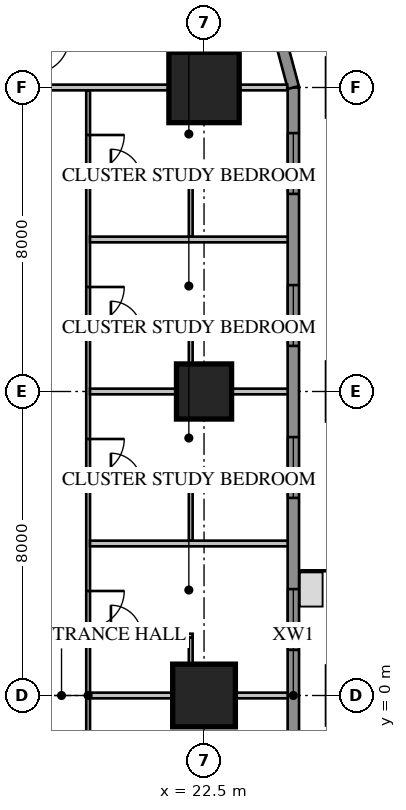
"""IFC4 building model, lengths in metres.
Left out: names, types, materials, properties, quantities, classifications, styles, units other than length and angle.
Written with IfcOpenShell. Run it as: python <this file> out.ifc"""

import sys

from ifc_helpers import new_model, si_unit, direction, frame, frame_2d, origin, origin_2d, place, context, subcontext, project, spatial, rectangle, extrude, element, fill, save


model = new_model("IFC4")
c1 = context("Model", 3, precision=1e-05, world=origin(), true_north=direction((0.0, 1.0)))
c2 = subcontext(c1, "Body", "Model", "MODEL_VIEW")
j1 = project(units=[si_unit("LENGTHUNIT", "METRE"), si_unit("PLANEANGLEUNIT", "RADIAN")], contexts=[c1])
p1 = place(None, origin())
s1 = spatial("IfcSite", under=j1, at=p1, CompositionType="ELEMENT")
p2 = place(p1, origin())
s2 = spatial("IfcBuilding", under=s1, at=p2, CompositionType="ELEMENT")
p3 = place(p2, frame((0.0, 0.0, 23.7)))
s3 = spatial("IfcBuildingStorey", under=s2, at=p3, CompositionType="ELEMENT", Elevation=23.7)
p4 = place(p3, frame((22.5, 0.0, 0.0), z_axis=(0.0, 0.0, 1.0), x_axis=(1.0, 0.0, 0.0)))
e1 = element("IfcColumn", 1, at=p4, inside=s3, PredefinedType="COLUMN", context=c2, shape_type="SweptSolid", body=[
    extrude(rectangle(XDim=1.65, YDim=1.65, at=origin_2d()), origin(), (0.0, 0.0, 1.0), 3.85),
])
p5 = place(p3, frame((22.5, 8.0, 0.0), z_axis=(0.0, 0.0, 1.0), x_axis=(1.0, 0.0, 0.0)))
e2 = element("IfcColumn", 2, at=p5, inside=s3, PredefinedType="COLUMN", context=c2, shape_type="SweptSolid", body=[
    extrude(rectangle(XDim=1.45, YDim=1.45, at=origin_2d()), origin(), (0.0, 0.0, 1.0), 3.85),
])
p6 = place(p3, frame((22.5, 16.0, 0.0), z_axis=(0.0, 0.0, 1.0), x_axis=(1.0, 0.0, 0.0)))
e3 = element("IfcColumn", 3, at=p6, inside=s3, PredefinedType="COLUMN", context=c2, shape_type="SweptSolid", body=[
    extrude(rectangle(XDim=1.85, YDim=1.85, at=origin_2d()), origin(), (0.0, 0.0, 1.0), 3.85),
])
p7 = place(p3, frame((24.85, -16.0, 0.0), z_axis=(0.0, 0.0, 1.0), x_axis=(0.0, 1.0, 0.0)))
e4 = element("IfcWall", 4, at=p7, inside=s3, PredefinedType="SOLIDWALL", context=c2, shape_type="SweptSolid", body=[
    extrude(rectangle(XDim=32.0, YDim=0.3, at=frame_2d((16.0, 0.0))), origin(), (0.0, 0.0, 1.0), 3.65),
])
p8 = place(p7, frame((1.2, 0.0, 0.75)))
e5 = element("IfcOpeningElement", 5, at=p8, cuts=e4, PredefinedType="OPENING", context=c2, shape_type="SweptSolid", body=[
    extrude(rectangle(XDim=1.6, YDim=1.8, at=frame_2d((0.8, 0.9))), frame((0.0, 0.17, 0.0), z_axis=(0.0, -1.0, 0.0), x_axis=(1.0, 0.0, 0.0)), (0.0, 0.0, 1.0), 0.34),
])
p9 = place(p7, frame((5.2, 0.0, 0.75)))
e6 = element("IfcOpeningElement", 6, at=p9, cuts=e4, PredefinedType="OPENING", context=c2, shape_type="SweptSolid", body=[
    extrude(rectangle(XDim=1.6, YDim=1.8, at=frame_2d((0.8, 0.9))), frame((0.0, 0.17, 0.0), z_axis=(0.0, -1.0, 0.0), x_axis=(1.0, 0.0, 0.0)), (0.0, 0.0, 1.0), 0.34),
])
p10 = place(p7, frame((17.2, 0.0, 0.75)))
e7 = element("IfcOpeningElement", 7, at=p10, cuts=e4, PredefinedType="OPENING", context=c2, shape_type="SweptSolid", body=[
    extrude(rectangle(XDim=1.6, YDim=1.8, at=frame_2d((0.8, 0.9))), frame((0.0, 0.17, 0.0), z_axis=(0.0, -1.0, 0.0), x_axis=(1.0, 0.0, 0.0)), (0.0, 0.0, 1.0), 0.34),
])
p11 = place(p7, frame((21.2, 0.0, 0.75)))
e8 = element("IfcOpeningElement", 8, at=p11, cuts=e4, PredefinedType="OPENING", context=c2, shape_type="SweptSolid", body=[
    extrude(rectangle(XDim=1.6, YDim=1.8, at=frame_2d((0.8, 0.9))), frame((0.0, 0.17, 0.0), z_axis=(0.0, -1.0, 0.0), x_axis=(1.0, 0.0, 0.0)), (0.0, 0.0, 1.0), 0.34),
])
p12 = place(p7, frame((25.2, 0.0, 0.75)))
e9 = element("IfcOpeningElement", 9, at=p12, cuts=e4, PredefinedType="OPENING", context=c2, shape_type="SweptSolid", body=[
    extrude(rectangle(XDim=1.6, YDim=1.8, at=frame_2d((0.8, 0.9))), frame((0.0, 0.17, 0.0), z_axis=(0.0, -1.0, 0.0), x_axis=(1.0, 0.0, 0.0)), (0.0, 0.0, 1.0), 0.34),
])
p13 = place(p7, frame((29.2, 0.0, 0.75)))
e10 = element("IfcOpeningElement", 10, at=p13, cuts=e4, PredefinedType="OPENING", context=c2, shape_type="SweptSolid", body=[
    extrude(rectangle(XDim=1.6, YDim=1.8, at=frame_2d((0.8, 0.9))), frame((0.0, 0.17, 0.0), z_axis=(0.0, -1.0, 0.0), x_axis=(1.0, 0.0, 0.0)), (0.0, 0.0, 1.0), 0.34),
])
p14 = place(p7, frame((8.8, 0.0, 0.75)))
e11 = element("IfcOpeningElement", 11, at=p14, cuts=e4, PredefinedType="OPENING", context=c2, shape_type="SweptSolid", body=[
    extrude(rectangle(XDim=2.4, YDim=1.8, at=frame_2d((1.2, 0.9))), frame((0.0, 0.17, 0.0), z_axis=(0.0, -1.0, 0.0), x_axis=(1.0, 0.0, 0.0)), (0.0, 0.0, 1.0), 0.34),
])
p15 = place(p7, frame((13.812, 0.0, 0.0)))
e12 = element("IfcOpeningElement", 12, at=p15, cuts=e4, PredefinedType="OPENING", context=c2, shape_type="SweptSolid", body=[
    extrude(rectangle(XDim=1.0, YDim=2.4, at=frame_2d((0.5, 1.2))), frame((0.0, 0.17, 0.0), z_axis=(0.0, -1.0, 0.0), x_axis=(1.0, 0.0, 0.0)), (0.0, 0.0, 1.0), 0.34),
])
p16 = place(p3, frame((24.85, 16.0, 0.0), z_axis=(0.0, 0.0, 1.0), x_axis=(-0.258839972501, 0.965920218567, 0.0)))
e13 = element("IfcWall", 13, at=p16, inside=s3, PredefinedType="SOLIDWALL", context=c2, shape_type="SweptSolid", body=[
    extrude(rectangle(XDim=4.581, YDim=0.3, at=frame_2d((2.291, 0.0))), origin(), (0.0, 0.0, 1.0), 3.65),
])
p17 = place(p3, frame((19.45, -15.925, 0.0), z_axis=(0.0, 0.0, 1.0), x_axis=(0.0, 1.0, 0.0)))
e14 = element("IfcWall", 14, at=p17, inside=s3, PredefinedType="PARTITIONING", context=c2, shape_type="SweptSolid", body=[
    extrude(rectangle(XDim=31.85, YDim=0.1, at=frame_2d((15.925, 0.0))), origin(), (0.0, 0.0, 1.0), 3.65),
])
p18 = place(p17, frame((10.125, 0.0, 0.0)))
e15 = element("IfcOpeningElement", 15, at=p18, cuts=e14, PredefinedType="OPENING", context=c2, shape_type="SweptSolid", body=[
    extrude(rectangle(XDim=1.0, YDim=2.1, at=frame_2d((0.5, 1.05))), frame((0.0, 0.07, 0.0), z_axis=(0.0, -1.0, 0.0), x_axis=(1.0, 0.0, 0.0)), (0.0, 0.0, 1.0), 0.14),
])
p19 = place(p17, frame((8.3, 0.0, 0.0)))
e16 = element("IfcOpeningElement", 16, at=p19, cuts=e14, PredefinedType="OPENING", context=c2, shape_type="SweptSolid", body=[
    extrude(rectangle(XDim=0.8, YDim=2.1, at=frame_2d((0.4, 1.05))), frame((0.0, 0.07, 0.0), z_axis=(0.0, -1.0, 0.0), x_axis=(1.0, 0.0, 0.0)), (0.0, 0.0, 1.0), 0.14),
])
p20 = place(p17, frame((1.725, 0.0, 0.0)))
e17 = element("IfcOpeningElement", 17, at=p20, cuts=e14, PredefinedType="OPENING", context=c2, shape_type="SweptSolid", body=[
    extrude(rectangle(XDim=0.95, YDim=2.1, at=frame_2d((0.475, 1.05))), frame((0.0, 0.07, 0.0), z_axis=(0.0, -1.0, 0.0), x_axis=(1.0, 0.0, 0.0)), (0.0, 0.0, 1.0), 0.14),
])
p21 = place(p17, frame((5.725, 0.0, 0.0)))
e18 = element("IfcOpeningElement", 18, at=p21, cuts=e14, PredefinedType="OPENING", context=c2, shape_type="SweptSolid", body=[
    extrude(rectangle(XDim=0.95, YDim=2.1, at=frame_2d((0.475, 1.05))), frame((0.0, 0.07, 0.0), z_axis=(0.0, -1.0, 0.0), x_axis=(1.0, 0.0, 0.0)), (0.0, 0.0, 1.0), 0.14),
])
p22 = place(p17, frame((17.725, 0.0, 0.0)))
e19 = element("IfcOpeningElement", 19, at=p22, cuts=e14, PredefinedType="OPENING", context=c2, shape_type="SweptSolid", body=[
    extrude(rectangle(XDim=0.95, YDim=2.1, at=frame_2d((0.475, 1.05))), frame((0.0, 0.07, 0.0), z_axis=(0.0, -1.0, 0.0), x_axis=(1.0, 0.0, 0.0)), (0.0, 0.0, 1.0), 0.14),
])
p23 = place(p17, frame((21.725, 0.0, 0.0)))
e20 = element("IfcOpeningElement", 20, at=p23, cuts=e14, PredefinedType="OPENING", context=c2, shape_type="SweptSolid", body=[
    extrude(rectangle(XDim=0.95, YDim=2.1, at=frame_2d((0.475, 1.05))), frame((0.0, 0.07, 0.0), z_axis=(0.0, -1.0, 0.0), x_axis=(1.0, 0.0, 0.0)), (0.0, 0.0, 1.0), 0.14),
])
p24 = place(p17, frame((25.725, 0.0, 0.0)))
e21 = element("IfcOpeningElement", 21, at=p24, cuts=e14, PredefinedType="OPENING", context=c2, shape_type="SweptSolid", body=[
    extrude(rectangle(XDim=0.95, YDim=2.1, at=frame_2d((0.475, 1.05))), frame((0.0, 0.07, 0.0), z_axis=(0.0, -1.0, 0.0), x_axis=(1.0, 0.0, 0.0)), (0.0, 0.0, 1.0), 0.14),
])
p25 = place(p17, frame((29.725, 0.0, 0.0)))
e22 = element("IfcOpeningElement", 22, at=p25, cuts=e14, PredefinedType="OPENING", context=c2, shape_type="SweptSolid", body=[
    extrude(rectangle(XDim=0.95, YDim=2.1, at=frame_2d((0.475, 1.05))), frame((0.0, 0.07, 0.0), z_axis=(0.0, -1.0, 0.0), x_axis=(1.0, 0.0, 0.0)), (0.0, 0.0, 1.0), 0.14),
])
p26 = place(p3, frame((19.5, 0.0, 0.0), z_axis=(0.0, 0.0, 1.0), x_axis=(1.0, 0.0, 0.0)))
e23 = element("IfcWall", 23, at=p26, inside=s3, PredefinedType="PARTITIONING", context=c2, shape_type="SweptSolid", body=[
    extrude(rectangle(XDim=5.2, YDim=0.15, at=frame_2d((2.6, 0.0))), origin(), (0.0, 0.0, 1.0), 2.957),
])
for number, where, z_axis, x_axis in (
    (24, (19.5, 4.0, 0.0), (0.0, 0.0, 1.0), (1.0, 0.0, 0.0)),
    (25, (19.5, 8.0, 0.0), (0.0, 0.0, 1.0), (1.0, 0.0, 0.0)),
    (26, (19.5, 12.0, 0.0), (0.0, 0.0, 1.0), (1.0, 0.0, 0.0)),
):
    element("IfcWall", number, at=place(p3, frame(where, z_axis=z_axis, x_axis=x_axis)), inside=s3, PredefinedType="PARTITIONING", context=c2, shape_type="SweptSolid", body=[
        extrude(rectangle(XDim=5.2, YDim=0.15, at=frame_2d((2.6, 0.0))), origin(), (0.0, 0.0, 1.0), 3.65),
    ])
p27 = place(p3, frame((18.1, 16.0, 0.0), z_axis=(0.0, 0.0, 1.0), x_axis=(1.0, 0.0, 0.0)))
e27 = element("IfcWall", 27, at=p27, inside=s3, PredefinedType="PARTITIONING", context=c2, shape_type="SweptSolid", body=[
    extrude(rectangle(XDim=6.589, YDim=0.15, at=frame_2d((3.295, 0.0))), origin(), (0.0, 0.0, 1.0), 3.65),
])
p28 = place(p3, frame((19.5, 1.575, 0.0), z_axis=(0.0, 0.0, 1.0), x_axis=(1.0, 0.0, 0.0)))
e28 = element("IfcWall", 28, at=p28, inside=s3, PredefinedType="PARTITIONING", context=c2, shape_type="SweptSolid", body=[
    extrude(rectangle(XDim=2.7, YDim=0.1, at=frame_2d((1.35, 0.0))), origin(), (0.0, 0.0, 1.0), 3.65),
])
p29 = place(p28, frame((0.55, 0.0, 0.0)))
e29 = element("IfcOpeningElement", 29, at=p29, cuts=e28, PredefinedType="OPENING", context=c2, shape_type="SweptSolid", body=[
    extrude(rectangle(XDim=0.8, YDim=2.1, at=frame_2d((0.4, 1.05))), frame((0.0, 0.07, 0.0), z_axis=(0.0, -1.0, 0.0), x_axis=(1.0, 0.0, 0.0)), (0.0, 0.0, 1.0), 0.14),
])
p30 = place(p3, frame((22.15, 0.075, 0.0), z_axis=(0.0, 0.0, 1.0), x_axis=(0.0, 1.0, 0.0)))
e30 = element("IfcWall", 30, at=p30, inside=s3, PredefinedType="PARTITIONING", context=c2, shape_type="SweptSolid", body=[
    extrude(rectangle(XDim=1.45, YDim=0.1, at=frame_2d((0.725, 0.0))), origin(), (0.0, 0.0, 1.0), 3.65),
])
p31 = place(p3, frame((19.5, 5.575, 0.0), z_axis=(0.0, 0.0, 1.0), x_axis=(1.0, 0.0, 0.0)))
e31 = element("IfcWall", 31, at=p31, inside=s3, PredefinedType="PARTITIONING", context=c2, shape_type="SweptSolid", body=[
    extrude(rectangle(XDim=2.7, YDim=0.1, at=frame_2d((1.35, 0.0))), origin(), (0.0, 0.0, 1.0), 3.65),
])
p32 = place(p31, frame((0.55, 0.0, 0.0)))
e32 = element("IfcOpeningElement", 32, at=p32, cuts=e31, PredefinedType="OPENING", context=c2, shape_type="SweptSolid", body=[
    extrude(rectangle(XDim=0.8, YDim=2.1, at=frame_2d((0.4, 1.05))), frame((0.0, 0.07, 0.0), z_axis=(0.0, -1.0, 0.0), x_axis=(1.0, 0.0, 0.0)), (0.0, 0.0, 1.0), 0.14),
])
p33 = place(p3, frame((22.15, 4.075, 0.0), z_axis=(0.0, 0.0, 1.0), x_axis=(0.0, 1.0, 0.0)))
e33 = element("IfcWall", 33, at=p33, inside=s3, PredefinedType="PARTITIONING", context=c2, shape_type="SweptSolid", body=[
    extrude(rectangle(XDim=1.45, YDim=0.1, at=frame_2d((0.725, 0.0))), origin(), (0.0, 0.0, 1.0), 3.65),
])
p34 = place(p3, frame((19.5, 9.575, 0.0), z_axis=(0.0, 0.0, 1.0), x_axis=(1.0, 0.0, 0.0)))
e34 = element("IfcWall", 34, at=p34, inside=s3, PredefinedType="PARTITIONING", context=c2, shape_type="SweptSolid", body=[
    extrude(rectangle(XDim=2.7, YDim=0.1, at=frame_2d((1.35, 0.0))), origin(), (0.0, 0.0, 1.0), 3.65),
])
p35 = place(p34, frame((0.55, 0.0, 0.0)))
e35 = element("IfcOpeningElement", 35, at=p35, cuts=e34, PredefinedType="OPENING", context=c2, shape_type="SweptSolid", body=[
    extrude(rectangle(XDim=0.8, YDim=2.1, at=frame_2d((0.4, 1.05))), frame((0.0, 0.07, 0.0), z_axis=(0.0, -1.0, 0.0), x_axis=(1.0, 0.0, 0.0)), (0.0, 0.0, 1.0), 0.14),
])
p36 = place(p3, frame((22.15, 8.075, 0.0), z_axis=(0.0, 0.0, 1.0), x_axis=(0.0, 1.0, 0.0)))
e36 = element("IfcWall", 36, at=p36, inside=s3, PredefinedType="PARTITIONING", context=c2, shape_type="SweptSolid", body=[
    extrude(rectangle(XDim=1.45, YDim=0.1, at=frame_2d((0.725, 0.0))), origin(), (0.0, 0.0, 1.0), 3.65),
])
p37 = place(p3, frame((19.5, 13.575, 0.0), z_axis=(0.0, 0.0, 1.0), x_axis=(1.0, 0.0, 0.0)))
e37 = element("IfcWall", 37, at=p37, inside=s3, PredefinedType="PARTITIONING", context=c2, shape_type="SweptSolid", body=[
    extrude(rectangle(XDim=2.7, YDim=0.1, at=frame_2d((1.35, 0.0))), origin(), (0.0, 0.0, 1.0), 3.65),
])
p38 = place(p37, frame((0.55, 0.0, 0.0)))
e38 = element("IfcOpeningElement", 38, at=p38, cuts=e37, PredefinedType="OPENING", context=c2, shape_type="SweptSolid", body=[
    extrude(rectangle(XDim=0.8, YDim=2.1, at=frame_2d((0.4, 1.05))), frame((0.0, 0.07, 0.0), z_axis=(0.0, -1.0, 0.0), x_axis=(1.0, 0.0, 0.0)), (0.0, 0.0, 1.0), 0.14),
])
p39 = place(p3, frame((22.15, 12.075, 0.0), z_axis=(0.0, 0.0, 1.0), x_axis=(0.0, 1.0, 0.0)))
e39 = element("IfcWall", 39, at=p39, inside=s3, PredefinedType="PARTITIONING", context=c2, shape_type="SweptSolid", body=[
    extrude(rectangle(XDim=1.45, YDim=0.1, at=frame_2d((0.725, 0.0))), origin(), (0.0, 0.0, 1.0), 3.65),
])
p40 = place(p10, origin())
e40 = element("IfcWindow", 40, at=p40, inside=s3, PartitioningType="SINGLE_PANEL", PredefinedType="WINDOW", context=c2, shape_type="SweptSolid", body=[
    extrude(rectangle(XDim=1.6, YDim=1.8, at=frame_2d((0.8, 0.9))), frame((0.0, 0.03, 0.0), z_axis=(0.0, -1.0, 0.0), x_axis=(1.0, 0.0, 0.0)), (0.0, 0.0, 1.0), 0.06),
])
fill(e7, e40)
p41 = place(p11, origin())
e41 = element("IfcWindow", 41, at=p41, inside=s3, PartitioningType="SINGLE_PANEL", PredefinedType="WINDOW", context=c2, shape_type="SweptSolid", body=[
    extrude(rectangle(XDim=1.6, YDim=1.8, at=frame_2d((0.8, 0.9))), frame((0.0, 0.03, 0.0), z_axis=(0.0, -1.0, 0.0), x_axis=(1.0, 0.0, 0.0)), (0.0, 0.0, 1.0), 0.06),
])
fill(e8, e41)
p42 = place(p12, origin())
e42 = element("IfcWindow", 42, at=p42, inside=s3, PartitioningType="SINGLE_PANEL", PredefinedType="WINDOW", context=c2, shape_type="SweptSolid", body=[
    extrude(rectangle(XDim=1.6, YDim=1.8, at=frame_2d((0.8, 0.9))), frame((0.0, 0.03, 0.0), z_axis=(0.0, -1.0, 0.0), x_axis=(1.0, 0.0, 0.0)), (0.0, 0.0, 1.0), 0.06),
])
fill(e9, e42)
p43 = place(p13, origin())
e43 = element("IfcWindow", 43, at=p43, inside=s3, PartitioningType="SINGLE_PANEL", PredefinedType="WINDOW", context=c2, shape_type="SweptSolid", body=[
    extrude(rectangle(XDim=1.6, YDim=1.8, at=frame_2d((0.8, 0.9))), frame((0.0, 0.03, 0.0), z_axis=(0.0, -1.0, 0.0), x_axis=(1.0, 0.0, 0.0)), (0.0, 0.0, 1.0), 0.06),
])
fill(e10, e43)
p44 = place(p22, origin())
e44 = element("IfcDoor", 44, at=p44, inside=s3, OperationType="SINGLE_SWING_RIGHT", PredefinedType="DOOR", context=c2, shape_type="SweptSolid", body=[
    extrude(rectangle(XDim=0.95, YDim=2.1, at=frame_2d((0.475, 1.05))), frame((0.0, 0.025, 0.0), z_axis=(0.0, -1.0, 0.0), x_axis=(1.0, 0.0, 0.0)), (0.0, 0.0, 1.0), 0.05),
])
fill(e19, e44)
p45 = place(p29, origin())
e45 = element("IfcDoor", 45, at=p45, inside=s3, OperationType="SINGLE_SWING_LEFT", PredefinedType="DOOR", context=c2, shape_type="SweptSolid", body=[
    extrude(rectangle(XDim=0.8, YDim=2.1, at=frame_2d((0.4, 1.05))), frame((0.0, 0.025, 0.0), z_axis=(0.0, -1.0, 0.0), x_axis=(1.0, 0.0, 0.0)), (0.0, 0.0, 1.0), 0.05),
])
fill(e29, e45)
p46 = place(p23, origin())
e46 = element("IfcDoor", 46, at=p46, inside=s3, OperationType="SINGLE_SWING_RIGHT", PredefinedType="DOOR", context=c2, shape_type="SweptSolid", body=[
    extrude(rectangle(XDim=0.95, YDim=2.1, at=frame_2d((0.475, 1.05))), frame((0.0, 0.025, 0.0), z_axis=(0.0, -1.0, 0.0), x_axis=(1.0, 0.0, 0.0)), (0.0, 0.0, 1.0), 0.05),
])
fill(e20, e46)
p47 = place(p32, origin())
e47 = element("IfcDoor", 47, at=p47, inside=s3, OperationType="SINGLE_SWING_LEFT", PredefinedType="DOOR", context=c2, shape_type="SweptSolid", body=[
    extrude(rectangle(XDim=0.8, YDim=2.1, at=frame_2d((0.4, 1.05))), frame((0.0, 0.025, 0.0), z_axis=(0.0, -1.0, 0.0), x_axis=(1.0, 0.0, 0.0)), (0.0, 0.0, 1.0), 0.05),
])
fill(e32, e47)
p48 = place(p24, origin())
e48 = element("IfcDoor", 48, at=p48, inside=s3, OperationType="SINGLE_SWING_RIGHT", PredefinedType="DOOR", context=c2, shape_type="SweptSolid", body=[
    extrude(rectangle(XDim=0.95, YDim=2.1, at=frame_2d((0.475, 1.05))), frame((0.0, 0.025, 0.0), z_axis=(0.0, -1.0, 0.0), x_axis=(1.0, 0.0, 0.0)), (0.0, 0.0, 1.0), 0.05),
])
fill(e21, e48)
p49 = place(p35, origin())
e49 = element("IfcDoor", 49, at=p49, inside=s3, OperationType="SINGLE_SWING_LEFT", PredefinedType="DOOR", context=c2, shape_type="SweptSolid", body=[
    extrude(rectangle(XDim=0.8, YDim=2.1, at=frame_2d((0.4, 1.05))), frame((0.0, 0.025, 0.0), z_axis=(0.0, -1.0, 0.0), x_axis=(1.0, 0.0, 0.0)), (0.0, 0.0, 1.0), 0.05),
])
fill(e35, e49)
p50 = place(p25, origin())
e50 = element("IfcDoor", 50, at=p50, inside=s3, OperationType="SINGLE_SWING_RIGHT", PredefinedType="DOOR", context=c2, shape_type="SweptSolid", body=[
    extrude(rectangle(XDim=0.95, YDim=2.1, at=frame_2d((0.475, 1.05))), frame((0.0, 0.025, 0.0), z_axis=(0.0, -1.0, 0.0), x_axis=(1.0, 0.0, 0.0)), (0.0, 0.0, 1.0), 0.05),
])
fill(e22, e50)
p51 = place(p38, origin())
e51 = element("IfcDoor", 51, at=p51, inside=s3, OperationType="SINGLE_SWING_LEFT", PredefinedType="DOOR", context=c2, shape_type="SweptSolid", body=[
    extrude(rectangle(XDim=0.8, YDim=2.1, at=frame_2d((0.4, 1.05))), frame((0.0, 0.025, 0.0), z_axis=(0.0, -1.0, 0.0), x_axis=(1.0, 0.0, 0.0)), (0.0, 0.0, 1.0), 0.05),
])
fill(e38, e51)
save(model, sys.argv[1])
